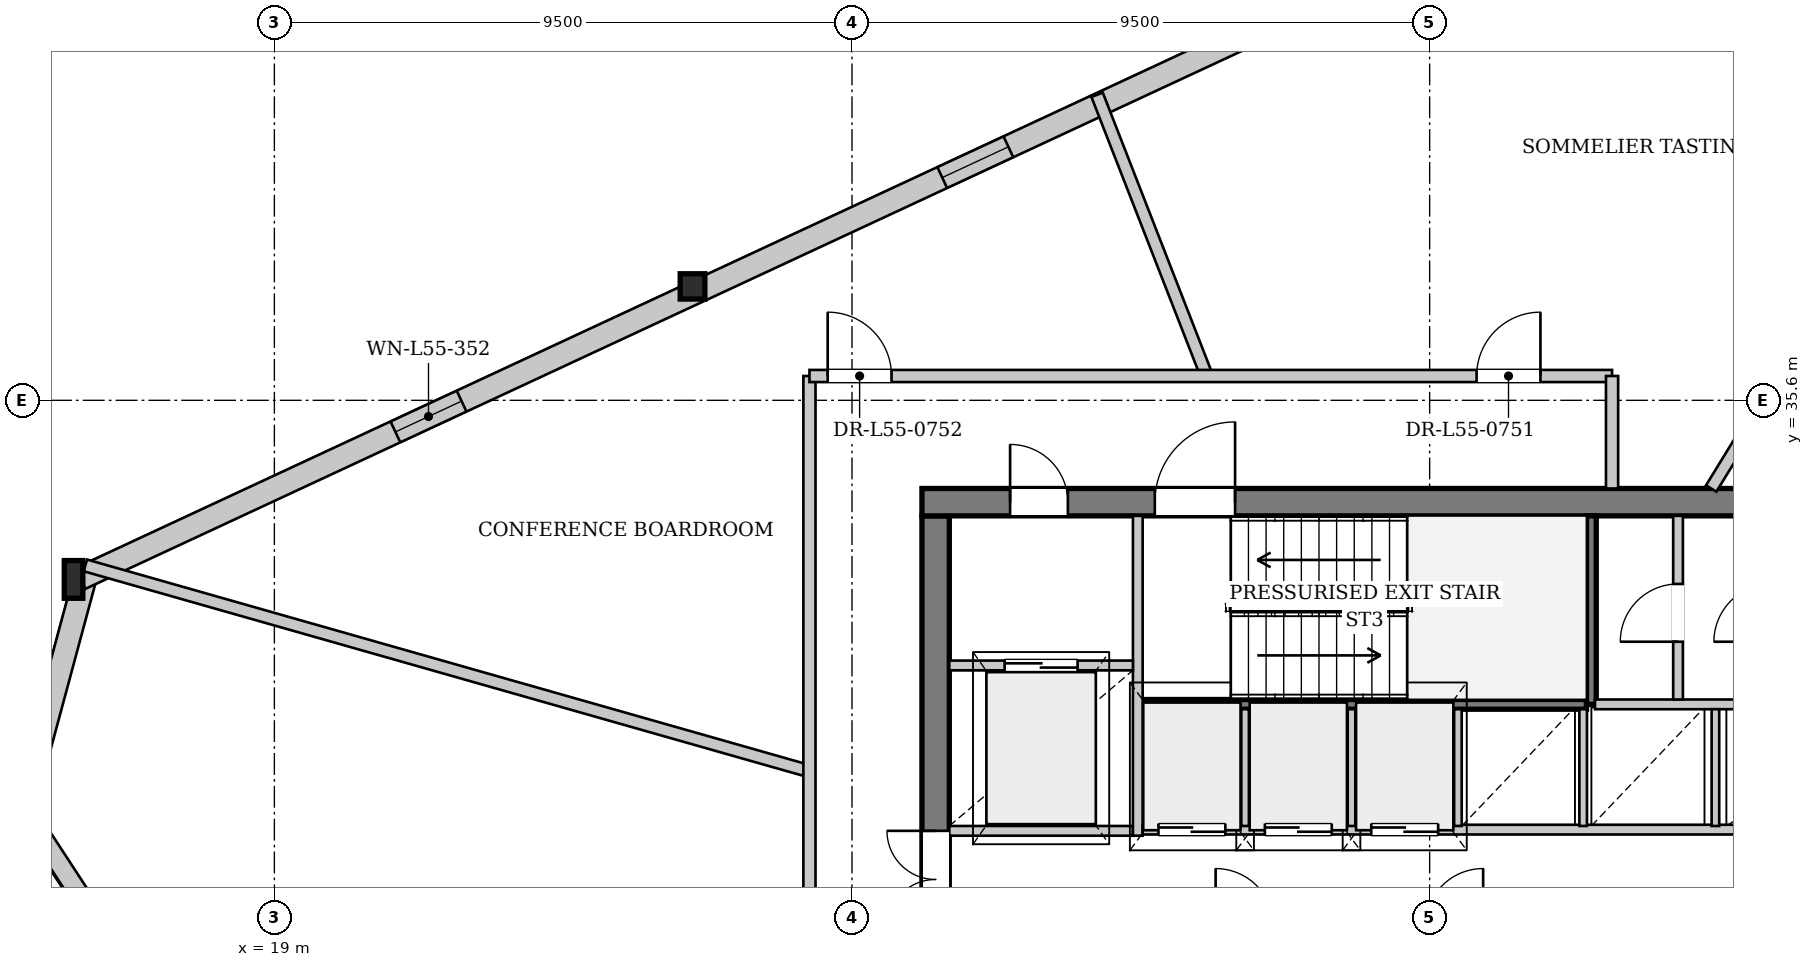
"""IFC4 building model, lengths in metres.
Left out: names, types, materials, properties, quantities, classifications, styles, units other than length and angle.
Written with IfcOpenShell. Run it as: python <this file> out.ifc"""

import sys

from ifc_helpers import new_model, si_unit, direction, frame, frame_2d, origin, origin_2d, place, context, subcontext, project, spatial, rectangle, i_section, extrude, source, transform, mapped, element, fill, save


model = new_model("IFC4")
c1 = context("Model", 3, precision=1e-05, world=origin(), true_north=direction((0.0, 1.0)))
c2 = subcontext(c1, "Body", "Model", "MODEL_VIEW")
j1 = project(units=[si_unit("LENGTHUNIT", "METRE"), si_unit("PLANEANGLEUNIT", "RADIAN")], contexts=[c1])
p1 = place(None, origin())
s1 = spatial("IfcSite", under=j1, at=p1, CompositionType="ELEMENT")
p2 = place(p1, origin())
s2 = spatial("IfcBuilding", under=s1, at=p2, CompositionType="ELEMENT")
p3 = place(p2, frame((0.0, 0.0, 209.6)))
s3 = spatial("IfcBuildingStorey", under=s2, at=p3, CompositionType="ELEMENT", Elevation=209.6)
m1 = source(origin(), c2, "Body", "SweptSolid", [
    extrude(i_section(OverallWidth=0.406, OverallDepth=0.416, WebThickness=0.027, FlangeThickness=0.042, at=origin_2d()), origin(), (0.0, 0.0, 1.0), 3.397),
])
p4 = place(p3, frame((25.951, 37.597, 0.0), z_axis=(-0.043621585932, -0.072726597963, 0.99639751063), x_axis=(0.857567687149, -0.514371132509, 0.0)))
e1 = element("IfcColumn", 1, at=p4, inside=s3, PredefinedType="COLUMN", context=c2, shape_type="MappedRepresentation", body=[
    mapped(m1, transform((0.0, 0.0, 0.0), x_axis=(1.0, 0.0, 0.0), y_axis=(0.0, 1.0, 0.0), z_axis=(0.0, 0.0, 1.0), scale=1.0)),
])
m2 = source(origin(), c2, "Body", "SweptSolid", [
    extrude(i_section(OverallWidth=0.305, OverallDepth=0.62, WebThickness=0.021, FlangeThickness=0.04, at=origin_2d()), origin(), (0.0, 0.0, 1.0), 3.407),
])
p5 = place(p3, frame((15.732, 32.844, 0.0), z_axis=(-0.020494982912, -0.111289190426, 0.993576706535), x_axis=(0.983462094692, -0.181114075391, 0.0)))
e2 = element("IfcColumn", 2, at=p5, inside=s3, PredefinedType="COLUMN", context=c2, shape_type="MappedRepresentation", body=[
    mapped(m2, transform((0.0, 0.0, 0.0), x_axis=(1.0, 0.0, 0.0), y_axis=(0.0, 1.0, 0.0), z_axis=(0.0, 0.0, 1.0), scale=1.0)),
])
p6 = place(p3, frame((24.481, 14.176, 0.0), z_axis=(0.0, 0.0, 1.0), x_axis=(-0.546955288252, 0.837161819873, 0.0)))
e3 = element("IfcWall", 3, at=p6, inside=s3, PredefinedType="SOLIDWALL", context=c2, shape_type="SweptSolid", body=[
    extrude(rectangle(XDim=17.695, YDim=0.32, at=frame_2d((8.848, 0.0))), origin(), (0.0, 0.0, 1.0), 2.822),
])
p7 = place(p6, frame((4.912, 0.0, 0.0)))
e4 = element("IfcOpeningElement", 4, at=p7, cuts=e3, PredefinedType="OPENING", context=c2, shape_type="SweptSolid", body=[
    extrude(rectangle(XDim=1.5, YDim=2.3, at=frame_2d((0.75, 1.15))), frame((0.0, 0.17, 0.0), z_axis=(0.0, -1.0, 0.0), x_axis=(1.0, 0.0, 0.0)), (0.0, 0.0, 1.0), 0.34),
])
p8 = place(p6, frame((11.794, 0.0, 0.352)))
e5 = element("IfcOpeningElement", 5, at=p8, cuts=e3, PredefinedType="OPENING", context=c2, shape_type="SweptSolid", body=[
    extrude(rectangle(XDim=2.6, YDim=2.35, at=frame_2d((1.3, 1.175))), frame((0.0, 0.17, 0.0), z_axis=(0.0, -1.0, 0.0), x_axis=(1.0, 0.0, 0.0)), (0.0, 0.0, 1.0), 0.34),
])
p9 = place(p3, frame((14.852, 28.853, 0.0), z_axis=(0.0, 0.0, 1.0), x_axis=(0.26046020021, 0.965484585121, 0.0)))
e6 = element("IfcWall", 6, at=p9, inside=s3, PredefinedType="SOLIDWALL", context=c2, shape_type="SweptSolid", body=[
    extrude(rectangle(XDim=4.083, YDim=0.38, at=frame_2d((2.042, 0.0))), origin(), (0.0, 0.0, 1.0), 2.822),
])
p10 = place(p3, frame((15.812, 32.672, 0.0), z_axis=(0.0, 0.0, 1.0), x_axis=(0.906732766682, 0.421705691003, 0.0)))
e7 = element("IfcWall", 7, at=p10, inside=s3, PredefinedType="SOLIDWALL", context=c2, shape_type="SweptSolid", body=[
    extrude(rectangle(XDim=22.54, YDim=0.38, at=frame_2d((11.27, 0.0))), origin(), (0.0, 0.0, 1.0), 2.822),
])
p11 = place(p10, frame((5.711, 0.0, 0.65)))
e8 = element("IfcOpeningElement", 8, at=p11, cuts=e7, PredefinedType="OPENING", context=c2, shape_type="SweptSolid", body=[
    extrude(rectangle(XDim=1.2, YDim=1.5, at=frame_2d((0.6, 0.75))), frame((0.0, 0.2, 0.0), z_axis=(0.0, -1.0, 0.0), x_axis=(1.0, 0.0, 0.0)), (0.0, 0.0, 1.0), 0.4),
])
p12 = place(p10, frame((15.629, 0.0, 0.65)))
e9 = element("IfcOpeningElement", 9, at=p12, cuts=e7, PredefinedType="OPENING", context=c2, shape_type="SweptSolid", body=[
    extrude(rectangle(XDim=1.2, YDim=1.5, at=frame_2d((0.6, 0.75))), frame((0.0, 0.2, 0.0), z_axis=(0.0, -1.0, 0.0), x_axis=(1.0, 0.0, 0.0)), (0.0, 0.0, 1.0), 0.4),
])
p13 = place(p3, frame((29.875, 19.5, 0.0), z_axis=(0.0, 0.0, 1.0), x_axis=(0.0, 1.0, 0.0)))
e10 = element("IfcWall", 10, at=p13, inside=s3, PredefinedType="SHEAR", context=c2, shape_type="SweptSolid", body=[
    extrude(rectangle(XDim=14.2, YDim=0.45, at=frame_2d((7.1, 0.0))), origin(), (0.0, 0.0, 1.0), 3.33),
])
p14 = place(p13, frame((7.42, 0.0, 0.0)))
e11 = element("IfcOpeningElement", 11, at=p14, cuts=e10, PredefinedType="OPENING", context=c2, shape_type="SweptSolid", body=[
    extrude(rectangle(XDim=1.6, YDim=2.2, at=frame_2d((0.8, 1.1))), frame((0.0, 0.235, 0.0), z_axis=(0.0, -1.0, 0.0), x_axis=(1.0, 0.0, 0.0)), (0.0, 0.0, 1.0), 0.47),
])
p15 = place(p3, frame((29.65, 33.925, 0.0), z_axis=(0.0, 0.0, 1.0), x_axis=(1.0, 0.0, 0.0)))
e12 = element("IfcWall", 12, at=p15, inside=s3, PredefinedType="SHEAR", context=c2, shape_type="SweptSolid", body=[
    extrude(rectangle(XDim=16.7, YDim=0.45, at=frame_2d((8.35, 0.0))), origin(), (0.0, 0.0, 1.0), 3.33),
])
p16 = place(p15, frame((1.45, 0.0, 0.0)))
e13 = element("IfcOpeningElement", 13, at=p16, cuts=e12, PredefinedType="OPENING", context=c2, shape_type="SweptSolid", body=[
    extrude(rectangle(XDim=0.95, YDim=2.1, at=frame_2d((0.475, 1.05))), frame((0.0, 0.235, 0.0), z_axis=(0.0, -1.0, 0.0), x_axis=(1.0, 0.0, 0.0)), (0.0, 0.0, 1.0), 0.47),
])
p17 = place(p15, frame((3.83, 0.0, 0.0)))
e14 = element("IfcOpeningElement", 14, at=p17, cuts=e12, PredefinedType="OPENING", context=c2, shape_type="SweptSolid", body=[
    extrude(rectangle(XDim=1.32, YDim=2.2, at=frame_2d((0.66, 1.1))), frame((0.0, 0.235, 0.0), z_axis=(0.0, -1.0, 0.0), x_axis=(1.0, 0.0, 0.0)), (0.0, 0.0, 1.0), 0.47),
])
p18 = place(p3, frame((33.28, 30.6, 0.0), z_axis=(0.0, 0.0, 1.0), x_axis=(1.0, 0.0, 0.0)))
e15 = element("IfcWall", 15, at=p18, inside=s3, PredefinedType="PARTITIONING", context=c2, shape_type="SweptSolid", body=[
    extrude(rectangle(XDim=7.3, YDim=0.16, at=frame_2d((3.65, 0.0))), origin(), (0.0, 0.0, 1.0), 3.33),
])
p19 = place(p3, frame((40.66, 30.6, 0.0), z_axis=(0.0, 0.0, 1.0), x_axis=(0.0, 1.0, 0.0)))
e16 = element("IfcWall", 16, at=p19, inside=s3, PredefinedType="PARTITIONING", context=c2, shape_type="SweptSolid", body=[
    extrude(rectangle(XDim=3.1, YDim=0.16, at=frame_2d((1.55, 0.0))), origin(), (0.0, 0.0, 1.0), 3.33),
])
p20 = place(p3, frame((30.1, 28.52, 0.0), z_axis=(0.0, 0.0, 1.0), x_axis=(1.0, 0.0, 0.0)))
e17 = element("IfcWall", 17, at=p20, inside=s3, PredefinedType="PARTITIONING", context=c2, shape_type="SweptSolid", body=[
    extrude(rectangle(XDim=3.02, YDim=0.16, at=frame_2d((1.51, 0.0))), origin(), (0.0, 0.0, 1.0), 3.33),
])
p21 = place(p3, frame((33.2, 28.44, 0.0), z_axis=(0.0, 0.0, 1.0), x_axis=(0.0, 1.0, 0.0)))
e18 = element("IfcWall", 18, at=p21, inside=s3, PredefinedType="PARTITIONING", context=c2, shape_type="SweptSolid", body=[
    extrude(rectangle(XDim=5.26, YDim=0.16, at=frame_2d((2.63, 0.0))), origin(), (0.0, 0.0, 1.0), 3.33),
])
p22 = place(p3, frame((30.1, 31.24, 0.0), z_axis=(0.0, 0.0, 1.0), x_axis=(1.0, 0.0, 0.0)))
e19 = element("IfcWall", 19, at=p22, inside=s3, PredefinedType="PARTITIONING", context=c2, shape_type="SweptSolid", body=[
    extrude(rectangle(XDim=3.02, YDim=0.16, at=frame_2d((1.51, 0.0))), origin(), (0.0, 0.0, 1.0), 3.33),
])
p23 = place(p22, frame((0.91, 0.0, 0.0)))
e20 = element("IfcOpeningElement", 20, at=p23, cuts=e19, PredefinedType="OPENING", context=c2, shape_type="SweptSolid", body=[
    extrude(rectangle(XDim=1.2, YDim=2.2, at=frame_2d((0.6, 1.1))), frame((0.0, 0.09, 0.0), z_axis=(0.0, -1.0, 0.0), x_axis=(1.0, 0.0, 0.0)), (0.0, 0.0, 1.0), 0.18),
])
p24 = place(p3, frame((33.28, 28.54, 0.0), z_axis=(0.0, 0.0, 1.0), x_axis=(1.0, 0.0, 0.0)))
e21 = element("IfcWall", 21, at=p24, inside=s3, PredefinedType="PARTITIONING", context=c2, shape_type="SweptSolid", body=[
    extrude(rectangle(XDim=12.62, YDim=0.16, at=frame_2d((6.31, 0.0))), origin(), (0.0, 0.0, 1.0), 3.33),
])
p25 = place(p24, frame((0.26, 0.0, 0.0)))
e22 = element("IfcOpeningElement", 22, at=p25, cuts=e21, PredefinedType="OPENING", context=c2, shape_type="SweptSolid", body=[
    extrude(rectangle(XDim=1.1, YDim=2.2, at=frame_2d((0.55, 1.1))), frame((0.0, 0.09, 0.0), z_axis=(0.0, -1.0, 0.0), x_axis=(1.0, 0.0, 0.0)), (0.0, 0.0, 1.0), 0.18),
])
p26 = place(p24, frame((2.01, 0.0, 0.0)))
e23 = element("IfcOpeningElement", 23, at=p26, cuts=e21, PredefinedType="OPENING", context=c2, shape_type="SweptSolid", body=[
    extrude(rectangle(XDim=1.1, YDim=2.2, at=frame_2d((0.55, 1.1))), frame((0.0, 0.09, 0.0), z_axis=(0.0, -1.0, 0.0), x_axis=(1.0, 0.0, 0.0)), (0.0, 0.0, 1.0), 0.18),
])
p27 = place(p24, frame((3.76, 0.0, 0.0)))
e24 = element("IfcOpeningElement", 24, at=p27, cuts=e21, PredefinedType="OPENING", context=c2, shape_type="SweptSolid", body=[
    extrude(rectangle(XDim=1.1, YDim=2.2, at=frame_2d((0.55, 1.1))), frame((0.0, 0.09, 0.0), z_axis=(0.0, -1.0, 0.0), x_axis=(1.0, 0.0, 0.0)), (0.0, 0.0, 1.0), 0.18),
])
p28 = place(p3, frame((40.72, 30.6, 0.0), z_axis=(0.0, 0.0, 1.0), x_axis=(1.0, 0.0, 0.0)))
e25 = element("IfcWall", 25, at=p28, inside=s3, PredefinedType="PARTITIONING", context=c2, shape_type="SweptSolid", body=[
    extrude(rectangle(XDim=5.18, YDim=0.16, at=frame_2d((2.59, 0.0))), origin(), (0.0, 0.0, 1.0), 3.33),
])
for number, where, z_axis, x_axis in (
    (26, (34.965, 28.6, 0.0), (0.0, 0.0, 1.0), (0.0, 1.0, 0.0)),
    (27, (36.715, 28.6, 0.0), (0.0, 0.0, 1.0), (0.0, 1.0, 0.0)),
    (28, (38.465, 28.6, 0.0), (0.0, 0.0, 1.0), (0.0, 1.0, 0.0)),
    (29, (40.525, 28.6, 0.0), (0.0, 0.0, 1.0), (0.0, 1.0, 0.0)),
    (30, (42.7, 28.6, 0.0), (0.0, 0.0, 1.0), (0.0, 1.0, 0.0)),
):
    element("IfcWall", number, at=place(p3, frame(where, z_axis=z_axis, x_axis=x_axis)), inside=s3, PredefinedType="PARTITIONING", context=c2, shape_type="SweptSolid", body=[
        extrude(rectangle(XDim=1.92, YDim=0.125, at=frame_2d((0.96, 0.0))), origin(), (0.0, 0.0, 1.0), 3.33),
    ])
p29 = place(p3, frame((42.085, 30.68, 0.0), z_axis=(0.0, 0.0, 1.0), x_axis=(0.0, 1.0, 0.0)))
e31 = element("IfcWall", 31, at=p29, inside=s3, PredefinedType="PARTITIONING", context=c2, shape_type="SweptSolid", body=[
    extrude(rectangle(XDim=3.02, YDim=0.16, at=frame_2d((1.51, 0.0))), origin(), (0.0, 0.0, 1.0), 3.33),
])
p30 = place(p29, frame((0.95, 0.0, 0.0)))
e32 = element("IfcOpeningElement", 32, at=p30, cuts=e31, PredefinedType="OPENING", context=c2, shape_type="SweptSolid", body=[
    extrude(rectangle(XDim=0.95, YDim=2.1, at=frame_2d((0.475, 1.05))), frame((0.0, 0.09, 0.0), z_axis=(0.0, -1.0, 0.0), x_axis=(1.0, 0.0, 0.0)), (0.0, 0.0, 1.0), 0.18),
])
p31 = place(p3, frame((42.631, 34.15, 0.0), z_axis=(0.0, 0.0, 1.0), x_axis=(0.522717649011, 0.852505870603, 0.0)))
e33 = element("IfcWall", 33, at=p31, inside=s3, PredefinedType="PARTITIONING", context=c2, shape_type="SweptSolid", body=[
    extrude(rectangle(XDim=1.472, YDim=0.2, at=frame_2d((0.736, 0.0))), origin(), (0.0, 0.0, 1.0), 3.33),
])
p32 = place(p3, frame((34.334, 36.0, 0.0), z_axis=(0.0, 0.0, 1.0), x_axis=(-0.363319658623, 0.93166454567, 0.0)))
e34 = element("IfcWall", 34, at=p32, inside=s3, PredefinedType="PARTITIONING", context=c2, shape_type="SweptSolid", body=[
    extrude(rectangle(XDim=4.963, YDim=0.2, at=frame_2d((2.481, 0.0))), origin(), (0.0, 0.0, 1.0), 3.33),
])
p33 = place(p3, frame((27.8, 29.5, 0.0), z_axis=(0.0, 0.0, 1.0), x_axis=(-0.961890693006, 0.273434260306, 0.0)))
e35 = element("IfcWall", 35, at=p33, inside=s3, PredefinedType="PARTITIONING", context=c2, shape_type="SweptSolid", body=[
    extrude(rectangle(XDim=12.381, YDim=0.2, at=frame_2d((6.19, 0.0))), origin(), (0.0, 0.0, 1.0), 2.925),
])
p34 = place(p3, frame((27.8, 17.2, 0.0), z_axis=(0.0, 0.0, 1.0), x_axis=(0.0, 1.0, 0.0)))
e36 = element("IfcWall", 36, at=p34, inside=s3, PredefinedType="PARTITIONING", context=c2, shape_type="SweptSolid", body=[
    extrude(rectangle(XDim=18.8, YDim=0.2, at=frame_2d((9.4, 0.0))), origin(), (0.0, 0.0, 1.0), 3.33),
])
p35 = place(p34, frame((6.181, 0.0, 0.0)))
e37 = element("IfcOpeningElement", 37, at=p35, cuts=e36, PredefinedType="OPENING", context=c2, shape_type="SweptSolid", body=[
    extrude(rectangle(XDim=1.05, YDim=2.2, at=frame_2d((0.525, 1.1))), frame((0.0, 0.11, 0.0), z_axis=(0.0, -1.0, 0.0), x_axis=(1.0, 0.0, 0.0)), (0.0, 0.0, 1.0), 0.22),
])
p36 = place(p3, frame((27.8, 36.0, 0.0), z_axis=(0.0, 0.0, 1.0), x_axis=(1.0, 0.0, 0.0)))
e38 = element("IfcWall", 38, at=p36, inside=s3, PredefinedType="PARTITIONING", context=c2, shape_type="SweptSolid", body=[
    extrude(rectangle(XDim=13.2, YDim=0.2, at=frame_2d((6.6, 0.0))), origin(), (0.0, 0.0, 1.0), 3.33),
])
p37 = place(p36, frame((10.972, 0.0, 0.0)))
e39 = element("IfcOpeningElement", 39, at=p37, cuts=e38, PredefinedType="OPENING", context=c2, shape_type="SweptSolid", body=[
    extrude(rectangle(XDim=1.05, YDim=2.2, at=frame_2d((0.525, 1.1))), frame((0.0, 0.11, 0.0), z_axis=(0.0, -1.0, 0.0), x_axis=(1.0, 0.0, 0.0)), (0.0, 0.0, 1.0), 0.22),
])
p38 = place(p36, frame((0.3, 0.0, 0.0)))
e40 = element("IfcOpeningElement", 40, at=p38, cuts=e38, PredefinedType="OPENING", context=c2, shape_type="SweptSolid", body=[
    extrude(rectangle(XDim=1.05, YDim=2.2, at=frame_2d((0.525, 1.1))), frame((0.0, 0.11, 0.0), z_axis=(0.0, -1.0, 0.0), x_axis=(1.0, 0.0, 0.0)), (0.0, 0.0, 1.0), 0.22),
])
p39 = place(p3, frame((41.0, 34.15, 0.0), z_axis=(0.0, 0.0, 1.0), x_axis=(0.0, 1.0, 0.0)))
e41 = element("IfcWall", 41, at=p39, inside=s3, PredefinedType="PARTITIONING", context=c2, shape_type="SweptSolid", body=[
    extrude(rectangle(XDim=1.85, YDim=0.2, at=frame_2d((0.925, 0.0))), origin(), (0.0, 0.0, 1.0), 3.33),
])
m3 = source(origin(), c2, "Body", "SweptSolid", [
    extrude(rectangle(XDim=1.2, YDim=1.5, at=frame_2d((0.6, 0.75))), frame((0.0, 0.03, 0.0), z_axis=(0.0, -1.0, 0.0), x_axis=(1.0, 0.0, 0.0)), (0.0, 0.0, 1.0), 0.06),
])
p40 = place(p11, origin())
e42 = element("IfcWindow", 42, at=p40, inside=s3, PartitioningType="SINGLE_PANEL", PredefinedType="WINDOW", context=c2, shape_type="MappedRepresentation", body=[
    mapped(m3, transform((0.0, 0.0, 0.0), x_axis=(1.0, 0.0, 0.0), y_axis=(0.0, 1.0, 0.0), z_axis=(0.0, 0.0, 1.0), scale=1.0)),
])
fill(e8, e42)
p41 = place(p12, origin())
e43 = element("IfcWindow", 43, at=p41, inside=s3, PartitioningType="SINGLE_PANEL", PredefinedType="WINDOW", context=c2, shape_type="MappedRepresentation", body=[
    mapped(m3, transform((0.0, 0.0, 0.0), x_axis=(1.0, 0.0, 0.0), y_axis=(0.0, 1.0, 0.0), z_axis=(0.0, 0.0, 1.0), scale=1.0)),
])
fill(e9, e43)
m4 = source(origin(), c2, "Body", "SweptSolid", [
    extrude(rectangle(XDim=1.6, YDim=2.2, at=frame_2d((0.8, 1.1))), frame((0.0, 0.025, 0.0), z_axis=(0.0, -1.0, 0.0), x_axis=(1.0, 0.0, 0.0)), (0.0, 0.0, 1.0), 0.05),
])
p42 = place(p14, origin())
e44 = element("IfcDoor", 44, at=p42, inside=s3, OperationType="DOUBLE_DOOR_SINGLE_SWING", PredefinedType="DOOR", context=c2, shape_type="MappedRepresentation", body=[
    mapped(m4, transform((0.0, 0.0, 0.0), x_axis=(1.0, 0.0, 0.0), y_axis=(0.0, 1.0, 0.0), z_axis=(0.0, 0.0, 1.0), scale=1.0)),
])
fill(e11, e44)
m5 = source(origin(), c2, "Body", "SweptSolid", [
    extrude(rectangle(XDim=0.95, YDim=2.1, at=frame_2d((0.475, 1.05))), frame((0.0, 0.025, 0.0), z_axis=(0.0, -1.0, 0.0), x_axis=(1.0, 0.0, 0.0)), (0.0, 0.0, 1.0), 0.05),
])
p43 = place(p16, origin())
e45 = element("IfcDoor", 45, at=p43, inside=s3, OperationType="SINGLE_SWING_LEFT", PredefinedType="DOOR", context=c2, shape_type="MappedRepresentation", body=[
    mapped(m5, transform((0.0, 0.0, 0.0), x_axis=(1.0, 0.0, 0.0), y_axis=(0.0, 1.0, 0.0), z_axis=(0.0, 0.0, 1.0), scale=1.0)),
])
fill(e13, e45)
m6 = source(origin(), c2, "Body", "SweptSolid", [
    extrude(rectangle(XDim=1.32, YDim=2.2, at=frame_2d((0.66, 1.1))), frame((0.0, 0.025, 0.0), z_axis=(0.0, -1.0, 0.0), x_axis=(1.0, 0.0, 0.0)), (0.0, 0.0, 1.0), 0.05),
])
p44 = place(p17, origin())
e46 = element("IfcDoor", 46, at=p44, inside=s3, OperationType="SINGLE_SWING_RIGHT", PredefinedType="DOOR", context=c2, shape_type="MappedRepresentation", body=[
    mapped(m6, transform((0.0, 0.0, 0.0), x_axis=(1.0, 0.0, 0.0), y_axis=(0.0, 1.0, 0.0), z_axis=(0.0, 0.0, 1.0), scale=1.0)),
])
fill(e14, e46)
m7 = source(origin(), c2, "Body", "SweptSolid", [
    extrude(rectangle(XDim=1.2, YDim=2.2, at=frame_2d((0.6, 1.1))), frame((0.0, 0.025, 0.0), z_axis=(0.0, -1.0, 0.0), x_axis=(1.0, 0.0, 0.0)), (0.0, 0.0, 1.0), 0.05),
])
p45 = place(p23, origin())
e47 = element("IfcDoor", 47, at=p45, inside=s3, OperationType="DOUBLE_DOOR_SLIDING", PredefinedType="DOOR", context=c2, shape_type="MappedRepresentation", body=[
    mapped(m7, transform((0.0, 0.0, 0.0), x_axis=(1.0, 0.0, 0.0), y_axis=(0.0, 1.0, 0.0), z_axis=(0.0, 0.0, 1.0), scale=1.0)),
])
fill(e20, e47)
m8 = source(origin(), c2, "Body", "SweptSolid", [
    extrude(rectangle(XDim=1.1, YDim=2.2, at=frame_2d((0.55, 1.1))), frame((0.0, 0.025, 0.0), z_axis=(0.0, -1.0, 0.0), x_axis=(1.0, 0.0, 0.0)), (0.0, 0.0, 1.0), 0.05),
])
p46 = place(p25, origin())
e48 = element("IfcDoor", 48, at=p46, inside=s3, OperationType="DOUBLE_DOOR_SLIDING", PredefinedType="DOOR", context=c2, shape_type="MappedRepresentation", body=[
    mapped(m8, transform((0.0, 0.0, 0.0), x_axis=(1.0, 0.0, 0.0), y_axis=(0.0, 1.0, 0.0), z_axis=(0.0, 0.0, 1.0), scale=1.0)),
])
fill(e22, e48)
p47 = place(p26, origin())
e49 = element("IfcDoor", 49, at=p47, inside=s3, OperationType="DOUBLE_DOOR_SLIDING", PredefinedType="DOOR", context=c2, shape_type="MappedRepresentation", body=[
    mapped(m8, transform((0.0, 0.0, 0.0), x_axis=(1.0, 0.0, 0.0), y_axis=(0.0, 1.0, 0.0), z_axis=(0.0, 0.0, 1.0), scale=1.0)),
])
fill(e23, e49)
p48 = place(p27, origin())
e50 = element("IfcDoor", 50, at=p48, inside=s3, OperationType="DOUBLE_DOOR_SLIDING", PredefinedType="DOOR", context=c2, shape_type="MappedRepresentation", body=[
    mapped(m8, transform((0.0, 0.0, 0.0), x_axis=(1.0, 0.0, 0.0), y_axis=(0.0, 1.0, 0.0), z_axis=(0.0, 0.0, 1.0), scale=1.0)),
])
fill(e24, e50)
p49 = place(p30, origin())
e51 = element("IfcDoor", 51, at=p49, inside=s3, OperationType="SINGLE_SWING_LEFT", PredefinedType="DOOR", context=c2, shape_type="MappedRepresentation", body=[
    mapped(m5, transform((0.0, 0.0, 0.0), x_axis=(1.0, 0.0, 0.0), y_axis=(0.0, 1.0, 0.0), z_axis=(0.0, 0.0, 1.0), scale=1.0)),
])
fill(e32, e51)
m9 = source(origin(), c2, "Body", "SweptSolid", [
    extrude(rectangle(XDim=1.05, YDim=2.2, at=frame_2d((0.525, 1.1))), frame((0.0, 0.025, 0.0), z_axis=(0.0, -1.0, 0.0), x_axis=(1.0, 0.0, 0.0)), (0.0, 0.0, 1.0), 0.05),
])
p50 = place(p37, origin())
e52 = element("IfcDoor", 52, at=p50, inside=s3, OperationType="SINGLE_SWING_RIGHT", PredefinedType="DOOR", context=c2, shape_type="MappedRepresentation", body=[
    mapped(m9, transform((0.0, 0.0, 0.0), x_axis=(1.0, 0.0, 0.0), y_axis=(0.0, 1.0, 0.0), z_axis=(0.0, 0.0, 1.0), scale=1.0)),
])
fill(e39, e52)
p51 = place(p38, origin())
e53 = element("IfcDoor", 53, at=p51, inside=s3, OperationType="SINGLE_SWING_LEFT", PredefinedType="DOOR", context=c2, shape_type="MappedRepresentation", body=[
    mapped(m9, transform((0.0, 0.0, 0.0), x_axis=(1.0, 0.0, 0.0), y_axis=(0.0, 1.0, 0.0), z_axis=(0.0, 0.0, 1.0), scale=1.0)),
])
fill(e40, e53)
save(model, sys.argv[1])
